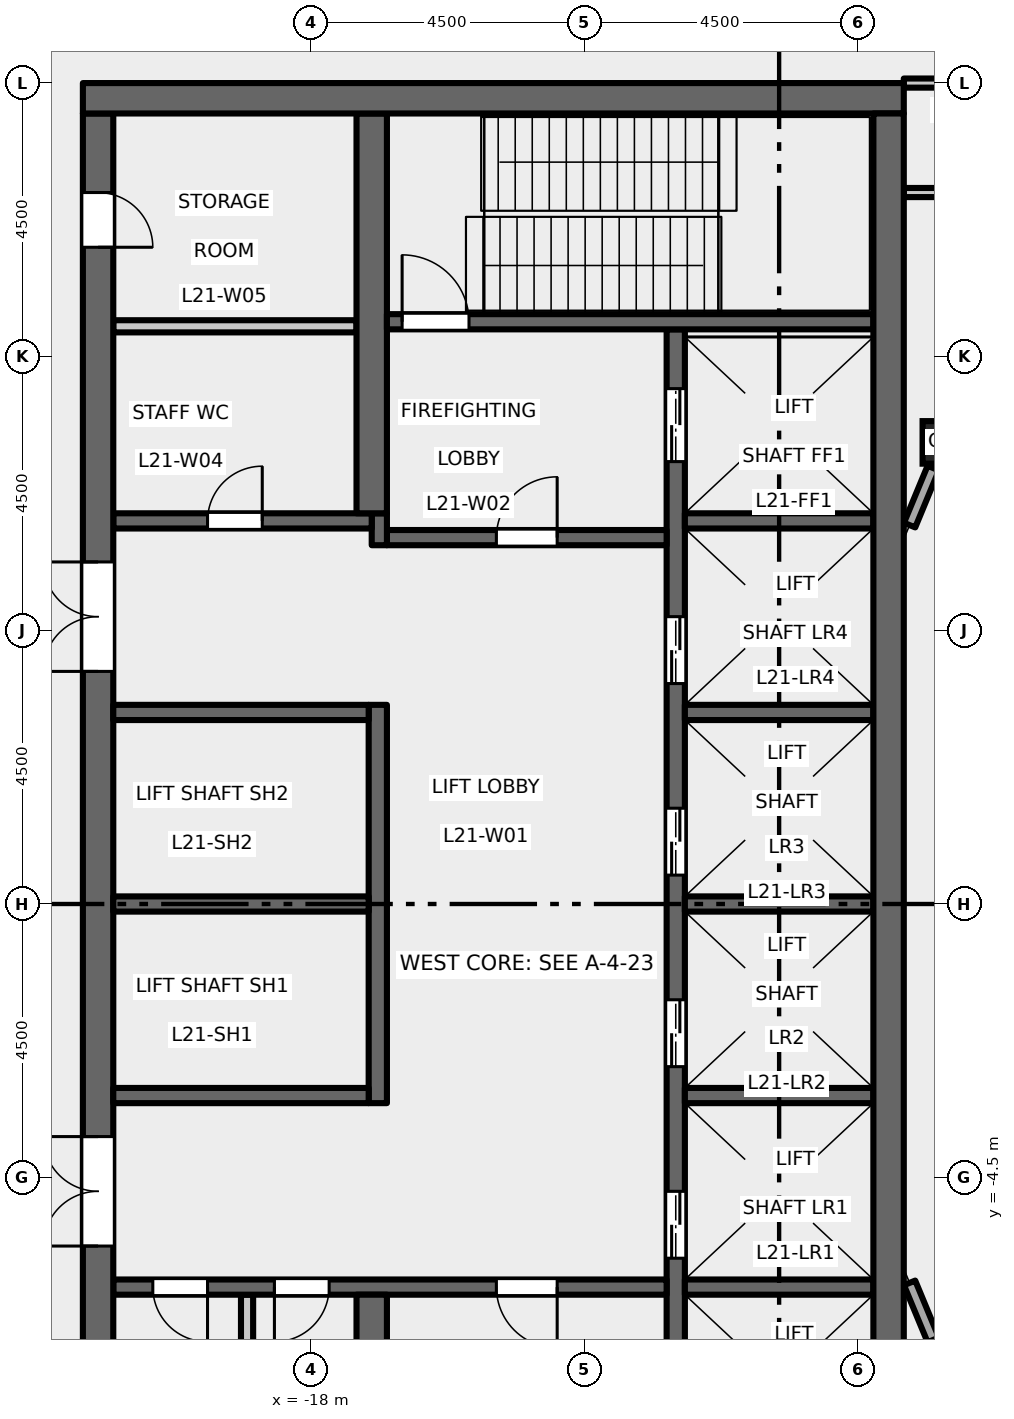
"""IFC4 building model, lengths in metres.
Left out: names, types, materials, properties, quantities, classifications, styles, units other than length and angle.
Written with IfcOpenShell. Run it as: python <this file> out.ifc"""

import sys

from ifc_helpers import new_model, si_unit, direction, frame, frame_2d, origin, origin_2d, place, context, subcontext, project, spatial, rectangle, hollow_rectangle, extrude, element, fill, save


model = new_model("IFC4")
c1 = context("Model", 3, precision=1e-05, world=origin(), true_north=direction((0.0, 1.0)))
c2 = subcontext(c1, "Body", "Model", "MODEL_VIEW")
j1 = project(units=[si_unit("LENGTHUNIT", "METRE"), si_unit("PLANEANGLEUNIT", "RADIAN")], contexts=[c1])
p1 = place(None, origin())
s1 = spatial("IfcSite", under=j1, at=p1, CompositionType="ELEMENT")
p2 = place(p1, origin())
s2 = spatial("IfcBuilding", under=s1, at=p2, CompositionType="ELEMENT")
p3 = place(p2, frame((0.0, 0.0, 99.2)))
s3 = spatial("IfcBuildingStorey", under=s2, at=p3, CompositionType="ELEMENT", Elevation=99.2)
p4 = place(p3, frame((-7.591, 7.591, 0.0), z_axis=(0.0, 0.0, 1.0), x_axis=(1.0, 0.0, 0.0)))
e1 = element("IfcColumn", 1, at=p4, inside=s3, PredefinedType="COLUMN", context=c2, shape_type="SweptSolid", body=[
    extrude(hollow_rectangle(XDim=0.7, YDim=0.7, WallThickness=0.04, at=origin_2d()), origin(), (0.0, 0.0, 1.0), 5.5),
])
p5 = place(p3, frame((-12.0, -9.45, 0.0), z_axis=(0.0, 0.0, 1.0), x_axis=(0.0, 1.0, 0.0)))
e2 = element("IfcWall", 2, at=p5, inside=s3, PredefinedType="SHEAR", context=c2, shape_type="SweptSolid", body=[
    extrude(rectangle(XDim=18.9, YDim=0.3, at=frame_2d((9.45, 0.0))), origin(), (0.0, 0.0, 1.0), 5.35),
])
p6 = place(p5, frame((3.625, 0.0, 0.0)))
e3 = element("IfcOpeningElement", 3, at=p6, cuts=e2, PredefinedType="OPENING", context=c2, shape_type="SweptSolid", body=[
    extrude(rectangle(XDim=1.1, YDim=2.1, at=frame_2d((0.55, 1.05))), frame((0.0, 0.16, 0.0), z_axis=(0.0, -1.0, 0.0), x_axis=(1.0, 0.0, 0.0)), (0.0, 0.0, 1.0), 0.32),
])
p7 = place(p5, frame((6.775, 0.0, 0.0)))
e4 = element("IfcOpeningElement", 4, at=p7, cuts=e2, PredefinedType="OPENING", context=c2, shape_type="SweptSolid", body=[
    extrude(rectangle(XDim=1.1, YDim=2.1, at=frame_2d((0.55, 1.05))), frame((0.0, 0.16, 0.0), z_axis=(0.0, -1.0, 0.0), x_axis=(1.0, 0.0, 0.0)), (0.0, 0.0, 1.0), 0.32),
])
p8 = place(p5, frame((9.925, 0.0, 0.0)))
e5 = element("IfcOpeningElement", 5, at=p8, cuts=e2, PredefinedType="OPENING", context=c2, shape_type="SweptSolid", body=[
    extrude(rectangle(XDim=1.1, YDim=2.1, at=frame_2d((0.55, 1.05))), frame((0.0, 0.16, 0.0), z_axis=(0.0, -1.0, 0.0), x_axis=(1.0, 0.0, 0.0)), (0.0, 0.0, 1.0), 0.32),
])
p9 = place(p5, frame((13.075, 0.0, 0.0)))
e6 = element("IfcOpeningElement", 6, at=p9, cuts=e2, PredefinedType="OPENING", context=c2, shape_type="SweptSolid", body=[
    extrude(rectangle(XDim=1.1, YDim=2.1, at=frame_2d((0.55, 1.05))), frame((0.0, 0.16, 0.0), z_axis=(0.0, -1.0, 0.0), x_axis=(1.0, 0.0, 0.0)), (0.0, 0.0, 1.0), 0.32),
])
p10 = place(p5, frame((16.725, 0.0, 0.0)))
e7 = element("IfcOpeningElement", 7, at=p10, cuts=e2, PredefinedType="OPENING", context=c2, shape_type="SweptSolid", body=[
    extrude(rectangle(XDim=1.2, YDim=2.1, at=frame_2d((0.6, 1.05))), frame((0.0, 0.16, 0.0), z_axis=(0.0, -1.0, 0.0), x_axis=(1.0, 0.0, 0.0)), (0.0, 0.0, 1.0), 0.32),
])
p11 = place(p5, frame((0.975, 0.0, 0.0)))
e8 = element("IfcOpeningElement", 8, at=p11, cuts=e2, PredefinedType="OPENING", context=c2, shape_type="SweptSolid", body=[
    extrude(rectangle(XDim=1.2, YDim=2.1, at=frame_2d((0.6, 1.05))), frame((0.0, 0.16, 0.0), z_axis=(0.0, -1.0, 0.0), x_axis=(1.0, 0.0, 0.0)), (0.0, 0.0, 1.0), 0.32),
])
p12 = place(p3, frame((-12.15, 6.025, 0.0), z_axis=(0.0, 0.0, 1.0), x_axis=(-1.0, 0.0, 0.0)))
e9 = element("IfcWall", 9, at=p12, inside=s3, PredefinedType="SHEAR", context=c2, shape_type="SweptSolid", body=[
    extrude(rectangle(XDim=4.6, YDim=0.25, at=frame_2d((2.3, 0.0))), origin(), (0.0, 0.0, 1.0), 5.35),
])
p13 = place(p12, frame((1.8, 0.0, 0.0)))
e10 = element("IfcOpeningElement", 10, at=p13, cuts=e9, PredefinedType="OPENING", context=c2, shape_type="SweptSolid", body=[
    extrude(rectangle(XDim=1.0, YDim=2.1, at=frame_2d((0.5, 1.05))), frame((0.0, 0.135, 0.0), z_axis=(0.0, -1.0, 0.0), x_axis=(1.0, 0.0, 0.0)), (0.0, 0.0, 1.0), 0.27),
])
p14 = place(p3, frame((-16.875, 5.9, 0.0), z_axis=(0.0, 0.0, 1.0), x_axis=(0.0, 1.0, 0.0)))
e11 = element("IfcWall", 11, at=p14, inside=s3, PredefinedType="SHEAR", context=c2, shape_type="SweptSolid", body=[
    extrude(rectangle(XDim=0.525, YDim=0.25, at=frame_2d((0.263, 0.0))), origin(), (0.0, 0.0, 1.0), 5.35),
])
p15 = place(p3, frame((-17.0, 6.3, 0.0), z_axis=(0.0, 0.0, 1.0), x_axis=(-1.0, 0.0, 0.0)))
e12 = element("IfcWall", 12, at=p15, inside=s3, PredefinedType="SHEAR", context=c2, shape_type="SweptSolid", body=[
    extrude(rectangle(XDim=4.25, YDim=0.25, at=frame_2d((2.125, 0.0))), origin(), (0.0, 0.0, 1.0), 5.35),
])
p16 = place(p15, frame((1.8, 0.0, 0.0)))
e13 = element("IfcOpeningElement", 13, at=p16, cuts=e12, PredefinedType="OPENING", context=c2, shape_type="SweptSolid", body=[
    extrude(rectangle(XDim=0.9, YDim=2.1, at=frame_2d((0.45, 1.05))), frame((0.0, 0.135, 0.0), z_axis=(0.0, -1.0, 0.0), x_axis=(1.0, 0.0, 0.0)), (0.0, 0.0, 1.0), 0.27),
])
p17 = place(p3, frame((-12.15, -6.3, 0.0), z_axis=(0.0, 0.0, 1.0), x_axis=(-1.0, 0.0, 0.0)))
e14 = element("IfcWall", 14, at=p17, inside=s3, PredefinedType="SHEAR", context=c2, shape_type="SweptSolid", body=[
    extrude(rectangle(XDim=9.1, YDim=0.25, at=frame_2d((4.55, 0.0))), origin(), (0.0, 0.0, 1.0), 5.35),
])
p18 = place(p17, frame((1.8, 0.0, 0.0)))
e15 = element("IfcOpeningElement", 15, at=p18, cuts=e14, PredefinedType="OPENING", context=c2, shape_type="SweptSolid", body=[
    extrude(rectangle(XDim=1.0, YDim=2.1, at=frame_2d((0.5, 1.05))), frame((0.0, 0.135, 0.0), z_axis=(0.0, -1.0, 0.0), x_axis=(1.0, 0.0, 0.0)), (0.0, 0.0, 1.0), 0.27),
])
p19 = place(p17, frame((5.55, 0.0, 0.0)))
e16 = element("IfcOpeningElement", 16, at=p19, cuts=e14, PredefinedType="OPENING", context=c2, shape_type="SweptSolid", body=[
    extrude(rectangle(XDim=0.9, YDim=2.1, at=frame_2d((0.45, 1.05))), frame((0.0, 0.135, 0.0), z_axis=(0.0, -1.0, 0.0), x_axis=(1.0, 0.0, 0.0)), (0.0, 0.0, 1.0), 0.27),
])
p20 = place(p17, frame((7.55, 0.0, 0.0)))
e17 = element("IfcOpeningElement", 17, at=p20, cuts=e14, PredefinedType="OPENING", context=c2, shape_type="SweptSolid", body=[
    extrude(rectangle(XDim=0.9, YDim=2.1, at=frame_2d((0.45, 1.05))), frame((0.0, 0.135, 0.0), z_axis=(0.0, -1.0, 0.0), x_axis=(1.0, 0.0, 0.0)), (0.0, 0.0, 1.0), 0.27),
])
p21 = place(p3, frame((-21.5, -13.0, 0.0), z_axis=(0.0, 0.0, 1.0), x_axis=(0.0, 1.0, 0.0)))
e18 = element("IfcWall", 18, at=p21, inside=s3, PredefinedType="SHEAR", context=c2, shape_type="SweptSolid", body=[
    extrude(rectangle(XDim=26.0, YDim=0.5, at=frame_2d((13.0, 0.0))), origin(), (0.0, 0.0, 1.0), 5.35),
])
p22 = place(p21, frame((16.825, 0.0, 0.0)))
e19 = element("IfcOpeningElement", 19, at=p22, cuts=e18, PredefinedType="OPENING", context=c2, shape_type="SweptSolid", body=[
    extrude(rectangle(XDim=1.8, YDim=2.1, at=frame_2d((0.9, 1.05))), frame((0.0, 0.26, 0.0), z_axis=(0.0, -1.0, 0.0), x_axis=(1.0, 0.0, 0.0)), (0.0, 0.0, 1.0), 0.52),
])
p23 = place(p21, frame((7.375, 0.0, 0.0)))
e20 = element("IfcOpeningElement", 20, at=p23, cuts=e18, PredefinedType="OPENING", context=c2, shape_type="SweptSolid", body=[
    extrude(rectangle(XDim=1.8, YDim=2.1, at=frame_2d((0.9, 1.05))), frame((0.0, 0.26, 0.0), z_axis=(0.0, -1.0, 0.0), x_axis=(1.0, 0.0, 0.0)), (0.0, 0.0, 1.0), 0.52),
])
p24 = place(p21, frame((23.8, 0.0, 0.0)))
e21 = element("IfcOpeningElement", 21, at=p24, cuts=e18, PredefinedType="OPENING", context=c2, shape_type="SweptSolid", body=[
    extrude(rectangle(XDim=0.9, YDim=2.1, at=frame_2d((0.45, 1.05))), frame((0.0, 0.26, 0.0), z_axis=(0.0, -1.0, 0.0), x_axis=(1.0, 0.0, 0.0)), (0.0, 0.0, 1.0), 0.52),
])
p25 = place(p3, frame((-17.25, 9.5, 0.0), z_axis=(0.0, 0.0, 1.0), x_axis=(-1.0, 0.0, 0.0)))
e22 = element("IfcWall", 22, at=p25, inside=s3, PredefinedType="PARTITIONING", context=c2, shape_type="SweptSolid", body=[
    extrude(rectangle(XDim=4.0, YDim=0.2, at=frame_2d((2.0, 0.0))), origin(), (0.0, 0.0, 1.0), 5.35),
])
p26 = place(p3, frame((-19.05, -13.0, 0.0), z_axis=(0.0, 0.0, 1.0), x_axis=(0.0, 1.0, 0.0)))
e23 = element("IfcWall", 23, at=p26, inside=s3, PredefinedType="PARTITIONING", context=c2, shape_type="SweptSolid", body=[
    extrude(rectangle(XDim=6.575, YDim=0.2, at=frame_2d((3.288, 0.0))), origin(), (0.0, 0.0, 1.0), 5.35),
])
p27 = place(p3, frame((-16.9, -3.275, 0.0), z_axis=(0.0, 0.0, 1.0), x_axis=(0.0, 1.0, 0.0)))
e24 = element("IfcWall", 24, at=p27, inside=s3, PredefinedType="SHEAR", context=c2, shape_type="SweptSolid", body=[
    extrude(rectangle(XDim=6.55, YDim=0.3, at=frame_2d((3.275, 0.0))), origin(), (0.0, 0.0, 1.0), 5.35),
])
for number, where, z_axis, x_axis in (
    (25, (-17.05, 0.0, 0.0), (0.0, 0.0, 1.0), (-1.0, 0.0, 0.0)),
    (26, (-17.05, 3.15, 0.0), (0.0, 0.0, 1.0), (-1.0, 0.0, 0.0)),
    (27, (-17.05, -3.15, 0.0), (0.0, 0.0, 1.0), (-1.0, 0.0, 0.0)),
):
    element("IfcWall", number, at=place(p3, frame(where, z_axis=z_axis, x_axis=x_axis)), inside=s3, PredefinedType="SHEAR", context=c2, shape_type="SweptSolid", body=[
        extrude(rectangle(XDim=4.2, YDim=0.25, at=frame_2d((2.1, 0.0))), origin(), (0.0, 0.0, 1.0), 5.35),
    ])
for number, where, z_axis, x_axis in (
    (28, (-17.0, 6.425, 0.0), (0.0, 0.0, 1.0), (0.0, 1.0, 0.0)),
    (29, (-17.0, -13.0, 0.0), (0.0, 0.0, 1.0), (0.0, 1.0, 0.0)),
):
    element("IfcWall", number, at=place(p3, frame(where, z_axis=z_axis, x_axis=x_axis)), inside=s3, PredefinedType="SHEAR", context=c2, shape_type="SweptSolid", body=[
        extrude(rectangle(XDim=6.575, YDim=0.5, at=frame_2d((3.288, 0.0))), origin(), (0.0, 0.0, 1.0), 5.35),
    ])
for number, where, z_axis, x_axis in (
    (30, (-8.75, 0.0, 0.0), (0.0, 0.0, 1.0), (-1.0, 0.0, 0.0)),
    (31, (-8.75, 3.15, 0.0), (0.0, 0.0, 1.0), (-1.0, 0.0, 0.0)),
    (32, (-8.75, 6.3, 0.0), (0.0, 0.0, 1.0), (-1.0, 0.0, 0.0)),
    (33, (-8.75, -3.15, 0.0), (0.0, 0.0, 1.0), (-1.0, 0.0, 0.0)),
    (34, (-8.75, -6.3, 0.0), (0.0, 0.0, 1.0), (-1.0, 0.0, 0.0)),
):
    element("IfcWall", number, at=place(p3, frame(where, z_axis=z_axis, x_axis=x_axis)), inside=s3, PredefinedType="SHEAR", context=c2, shape_type="SweptSolid", body=[
        extrude(rectangle(XDim=3.1, YDim=0.25, at=frame_2d((1.55, 0.0))), origin(), (0.0, 0.0, 1.0), 5.35),
    ])
p28 = place(p3, frame((-8.75, 9.575, 0.0), z_axis=(0.0, 0.0, 1.0), x_axis=(-1.0, 0.0, 0.0)))
e35 = element("IfcWall", 35, at=p28, inside=s3, PredefinedType="SHEAR", context=c2, shape_type="SweptSolid", body=[
    extrude(rectangle(XDim=8.0, YDim=0.25, at=frame_2d((4.0, 0.0))), origin(), (0.0, 0.0, 1.0), 5.35),
])
p29 = place(p28, frame((6.65, 0.0, 0.0)))
e36 = element("IfcOpeningElement", 36, at=p29, cuts=e35, PredefinedType="OPENING", context=c2, shape_type="SweptSolid", body=[
    extrude(rectangle(XDim=1.1, YDim=2.1, at=frame_2d((0.55, 1.05))), frame((0.0, 0.135, 0.0), z_axis=(0.0, -1.0, 0.0), x_axis=(1.0, 0.0, 0.0)), (0.0, 0.0, 1.0), 0.27),
])
p30 = place(p3, frame((-8.25, 13.25, 0.0), z_axis=(0.0, 0.0, 1.0), x_axis=(-1.0, 0.0, 0.0)))
e37 = element("IfcWall", 37, at=p30, inside=s3, PredefinedType="SHEAR", context=c2, shape_type="SweptSolid", body=[
    extrude(rectangle(XDim=13.5, YDim=0.5, at=frame_2d((6.75, 0.0))), origin(), (0.0, 0.0, 1.0), 5.35),
])
p31 = place(p3, frame((-8.5, -13.0, 0.0), z_axis=(0.0, 0.0, 1.0), x_axis=(0.0, 1.0, 0.0)))
e38 = element("IfcWall", 38, at=p31, inside=s3, PredefinedType="SHEAR", context=c2, shape_type="SweptSolid", body=[
    extrude(rectangle(XDim=26.0, YDim=0.5, at=frame_2d((13.0, 0.0))), origin(), (0.0, 0.0, 1.0), 5.35),
])
for number, where, z_axis, x_axis in (
    (39, (-7.766, 7.168, 0.0), (0.0, 0.0, 1.0), (-0.383, -0.924, 0.0)),
    (40, (-8.154, -6.231, 0.0), (0.0, 0.0, 1.0), (0.383, -0.924, 0.0)),
):
    element("IfcWall", number, at=place(p3, frame(where, z_axis=z_axis, x_axis=x_axis)), inside=s3, PredefinedType="STANDARD", context=c2, shape_type="SweptSolid", body=[
        extrude(rectangle(XDim=1.015, YDim=0.2, at=frame_2d((0.507, 0.0))), origin(), (0.0, 0.0, 1.0), 4.826),
    ])
p32 = place(p3, frame((-8.25, 11.7, 0.0), z_axis=(0.0, 0.0, 1.0), x_axis=(1.0, 0.0, 0.0)))
e41 = element("IfcWall", 41, at=p32, inside=s3, PredefinedType="PARTITIONING", context=c2, shape_type="SweptSolid", body=[
    extrude(rectangle(XDim=15.25, YDim=0.15, at=frame_2d((7.625, 0.0))), origin(), (0.0, 0.0, 1.0), 5.35),
])
p33 = place(p32, frame((4.9, 0.0, 0.0)))
e42 = element("IfcOpeningElement", 42, at=p33, cuts=e41, PredefinedType="OPENING", context=c2, shape_type="SweptSolid", body=[
    extrude(rectangle(XDim=1.0, YDim=2.1, at=frame_2d((0.5, 1.05))), frame((0.0, 0.085, 0.0), z_axis=(0.0, -1.0, 0.0), x_axis=(1.0, 0.0, 0.0)), (0.0, 0.0, 1.0), 0.17),
])
p34 = place(p32, frame((7.15, 0.0, 0.0)))
e43 = element("IfcOpeningElement", 43, at=p34, cuts=e41, PredefinedType="OPENING", context=c2, shape_type="SweptSolid", body=[
    extrude(rectangle(XDim=1.0, YDim=2.1, at=frame_2d((0.5, 1.05))), frame((0.0, 0.085, 0.0), z_axis=(0.0, -1.0, 0.0), x_axis=(1.0, 0.0, 0.0)), (0.0, 0.0, 1.0), 0.17),
])
p35 = place(p32, frame((13.65, 0.0, 0.0)))
e44 = element("IfcOpeningElement", 44, at=p35, cuts=e41, PredefinedType="OPENING", context=c2, shape_type="SweptSolid", body=[
    extrude(rectangle(XDim=1.0, YDim=2.1, at=frame_2d((0.5, 1.05))), frame((0.0, 0.085, 0.0), z_axis=(0.0, -1.0, 0.0), x_axis=(1.0, 0.0, 0.0)), (0.0, 0.0, 1.0), 0.17),
])
p36 = place(p3, frame((-8.25, 13.5, 0.0), z_axis=(0.0, 0.0, 1.0), x_axis=(1.0, 0.0, 0.0)))
e45 = element("IfcWall", 45, at=p36, inside=s3, PredefinedType="PARTITIONING", context=c2, shape_type="SweptSolid", body=[
    extrude(rectangle(XDim=16.5, YDim=0.15, at=frame_2d((8.25, 0.0))), origin(), (0.0, 0.0, 1.0), 5.35),
])
p37 = place(p36, frame((0.65, 0.0, 0.0)))
e46 = element("IfcOpeningElement", 46, at=p37, cuts=e45, PredefinedType="OPENING", context=c2, shape_type="SweptSolid", body=[
    extrude(rectangle(XDim=1.0, YDim=2.1, at=frame_2d((0.5, 1.05))), frame((0.0, 0.085, 0.0), z_axis=(0.0, -1.0, 0.0), x_axis=(1.0, 0.0, 0.0)), (0.0, 0.0, 1.0), 0.17),
])
p38 = place(p13, origin())
e47 = element("IfcDoor", 47, at=p38, inside=s3, OperationType="SINGLE_SWING_LEFT", PredefinedType="DOOR", context=c2, shape_type="SweptSolid", body=[
    extrude(rectangle(XDim=1.0, YDim=2.1, at=frame_2d((0.5, 1.05))), frame((0.0, 0.025, 0.0), z_axis=(0.0, -1.0, 0.0), x_axis=(1.0, 0.0, 0.0)), (0.0, 0.0, 1.0), 0.05),
])
fill(e10, e47)
p39 = place(p18, origin())
e48 = element("IfcDoor", 48, at=p39, inside=s3, OperationType="SINGLE_SWING_RIGHT", PredefinedType="DOOR", context=c2, shape_type="SweptSolid", body=[
    extrude(rectangle(XDim=1.0, YDim=2.1, at=frame_2d((0.5, 1.05))), frame((0.0, 0.025, 0.0), z_axis=(0.0, -1.0, 0.0), x_axis=(1.0, 0.0, 0.0)), (0.0, 0.0, 1.0), 0.05),
])
fill(e15, e48)
p40 = place(p29, origin())
e49 = element("IfcDoor", 49, at=p40, inside=s3, OperationType="SINGLE_SWING_RIGHT", PredefinedType="DOOR", context=c2, shape_type="SweptSolid", body=[
    extrude(rectangle(XDim=1.1, YDim=2.1, at=frame_2d((0.55, 1.05))), frame((0.0, 0.025, 0.0), z_axis=(0.0, -1.0, 0.0), x_axis=(1.0, 0.0, 0.0)), (0.0, 0.0, 1.0), 0.05),
])
fill(e36, e49)
p41 = place(p22, origin())
e50 = element("IfcDoor", 50, at=p41, inside=s3, OperationType="DOUBLE_DOOR_DOUBLE_SWING", PredefinedType="DOOR", context=c2, shape_type="SweptSolid", body=[
    extrude(rectangle(XDim=1.8, YDim=2.1, at=frame_2d((0.9, 1.05))), frame((0.0, 0.025, 0.0), z_axis=(0.0, -1.0, 0.0), x_axis=(1.0, 0.0, 0.0)), (0.0, 0.0, 1.0), 0.05),
])
fill(e19, e50)
p42 = place(p23, origin())
e51 = element("IfcDoor", 51, at=p42, inside=s3, OperationType="DOUBLE_DOOR_DOUBLE_SWING", PredefinedType="DOOR", context=c2, shape_type="SweptSolid", body=[
    extrude(rectangle(XDim=1.8, YDim=2.1, at=frame_2d((0.9, 1.05))), frame((0.0, 0.025, 0.0), z_axis=(0.0, -1.0, 0.0), x_axis=(1.0, 0.0, 0.0)), (0.0, 0.0, 1.0), 0.05),
])
fill(e20, e51)
p43 = place(p6, origin())
e52 = element("IfcDoor", 52, at=p43, inside=s3, OperationType="DOUBLE_DOOR_SLIDING", PredefinedType="DOOR", context=c2, shape_type="SweptSolid", body=[
    extrude(rectangle(XDim=1.1, YDim=2.1, at=frame_2d((0.55, 1.05))), frame((0.0, 0.025, 0.0), z_axis=(0.0, -1.0, 0.0), x_axis=(1.0, 0.0, 0.0)), (0.0, 0.0, 1.0), 0.05),
])
fill(e3, e52)
p44 = place(p7, origin())
e53 = element("IfcDoor", 53, at=p44, inside=s3, OperationType="DOUBLE_DOOR_SLIDING", PredefinedType="DOOR", context=c2, shape_type="SweptSolid", body=[
    extrude(rectangle(XDim=1.1, YDim=2.1, at=frame_2d((0.55, 1.05))), frame((0.0, 0.025, 0.0), z_axis=(0.0, -1.0, 0.0), x_axis=(1.0, 0.0, 0.0)), (0.0, 0.0, 1.0), 0.05),
])
fill(e4, e53)
p45 = place(p8, origin())
e54 = element("IfcDoor", 54, at=p45, inside=s3, OperationType="DOUBLE_DOOR_SLIDING", PredefinedType="DOOR", context=c2, shape_type="SweptSolid", body=[
    extrude(rectangle(XDim=1.1, YDim=2.1, at=frame_2d((0.55, 1.05))), frame((0.0, 0.025, 0.0), z_axis=(0.0, -1.0, 0.0), x_axis=(1.0, 0.0, 0.0)), (0.0, 0.0, 1.0), 0.05),
])
fill(e5, e54)
p46 = place(p9, origin())
e55 = element("IfcDoor", 55, at=p46, inside=s3, OperationType="DOUBLE_DOOR_SLIDING", PredefinedType="DOOR", context=c2, shape_type="SweptSolid", body=[
    extrude(rectangle(XDim=1.1, YDim=2.1, at=frame_2d((0.55, 1.05))), frame((0.0, 0.025, 0.0), z_axis=(0.0, -1.0, 0.0), x_axis=(1.0, 0.0, 0.0)), (0.0, 0.0, 1.0), 0.05),
])
fill(e6, e55)
p47 = place(p10, origin())
e56 = element("IfcDoor", 56, at=p47, inside=s3, OperationType="DOUBLE_DOOR_SLIDING", PredefinedType="DOOR", context=c2, shape_type="SweptSolid", body=[
    extrude(rectangle(XDim=1.2, YDim=2.1, at=frame_2d((0.6, 1.05))), frame((0.0, 0.025, 0.0), z_axis=(0.0, -1.0, 0.0), x_axis=(1.0, 0.0, 0.0)), (0.0, 0.0, 1.0), 0.05),
])
fill(e7, e56)
p48 = place(p16, origin())
e57 = element("IfcDoor", 57, at=p48, inside=s3, OperationType="SINGLE_SWING_LEFT", PredefinedType="DOOR", context=c2, shape_type="SweptSolid", body=[
    extrude(rectangle(XDim=0.9, YDim=2.1, at=frame_2d((0.45, 1.05))), frame((0.0, 0.025, 0.0), z_axis=(0.0, -1.0, 0.0), x_axis=(1.0, 0.0, 0.0)), (0.0, 0.0, 1.0), 0.05),
])
fill(e13, e57)
p49 = place(p24, origin())
e58 = element("IfcDoor", 58, at=p49, inside=s3, OperationType="SINGLE_SWING_LEFT", PredefinedType="DOOR", context=c2, shape_type="SweptSolid", body=[
    extrude(rectangle(XDim=0.9, YDim=2.1, at=frame_2d((0.45, 1.05))), frame((0.0, 0.025, 0.0), z_axis=(0.0, -1.0, 0.0), x_axis=(1.0, 0.0, 0.0)), (0.0, 0.0, 1.0), 0.05),
])
fill(e21, e58)
p50 = place(p19, origin())
e59 = element("IfcDoor", 59, at=p50, inside=s3, OperationType="SINGLE_SWING_LEFT", PredefinedType="DOOR", context=c2, shape_type="SweptSolid", body=[
    extrude(rectangle(XDim=0.9, YDim=2.1, at=frame_2d((0.45, 1.05))), frame((0.0, 0.025, 0.0), z_axis=(0.0, -1.0, 0.0), x_axis=(1.0, 0.0, 0.0)), (0.0, 0.0, 1.0), 0.05),
])
fill(e16, e59)
p51 = place(p20, origin())
e60 = element("IfcDoor", 60, at=p51, inside=s3, OperationType="SINGLE_SWING_RIGHT", PredefinedType="DOOR", context=c2, shape_type="SweptSolid", body=[
    extrude(rectangle(XDim=0.9, YDim=2.1, at=frame_2d((0.45, 1.05))), frame((0.0, 0.025, 0.0), z_axis=(0.0, -1.0, 0.0), x_axis=(1.0, 0.0, 0.0)), (0.0, 0.0, 1.0), 0.05),
])
fill(e17, e60)
save(model, sys.argv[1])
